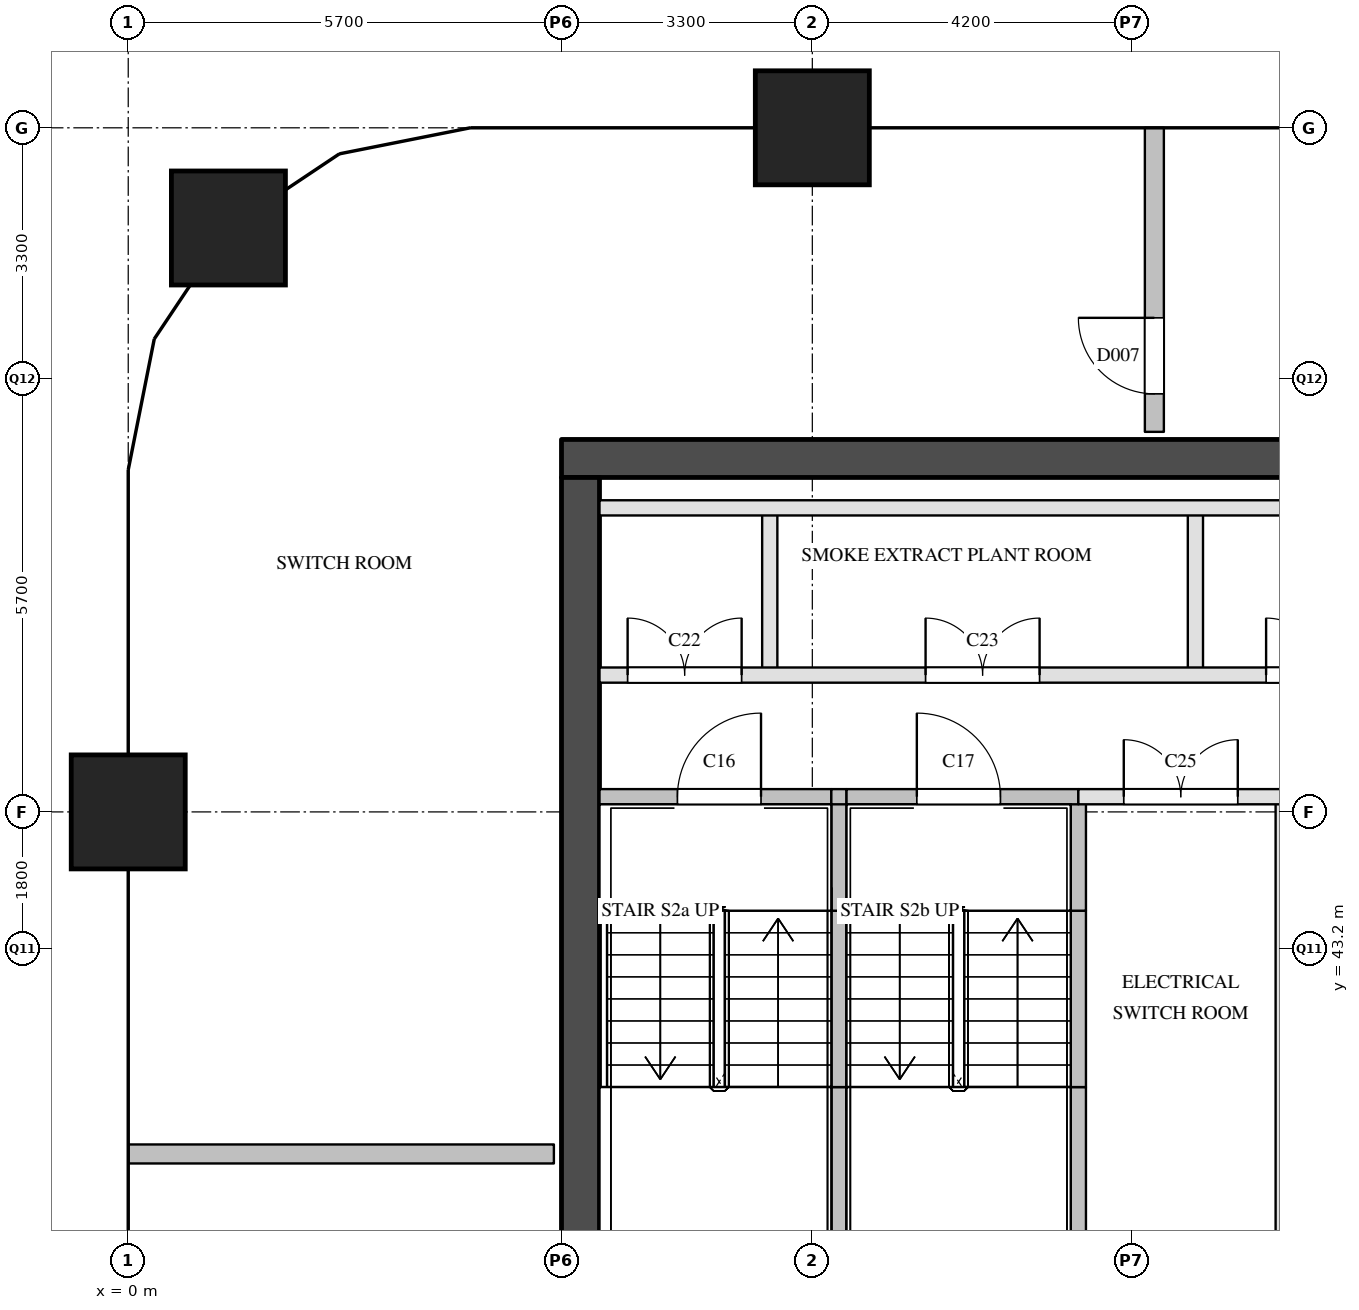
"""IFC4 building model, lengths in metres.
Left out: names, types, materials, properties, quantities, classifications, styles, units other than length and angle.
Written with IfcOpenShell. Run it as: python <this file> out.ifc"""

import sys

from ifc_helpers import new_model, si_unit, direction, frame, frame_2d, origin, origin_2d, place, context, subcontext, project, spatial, rectangle, extrude, element, fill, save


model = new_model("IFC4")
c1 = context("Model", 3, precision=1e-05, world=origin(), true_north=direction((0.0, 1.0)))
c2 = subcontext(c1, "Body", "Model", "MODEL_VIEW")
j1 = project(units=[si_unit("LENGTHUNIT", "METRE"), si_unit("PLANEANGLEUNIT", "RADIAN")], contexts=[c1])
p1 = place(None, origin())
s1 = spatial("IfcSite", under=j1, at=p1, CompositionType="ELEMENT")
p2 = place(p1, origin())
s2 = spatial("IfcBuilding", under=s1, at=p2, CompositionType="ELEMENT")
p3 = place(p2, frame((0.0, 0.0, 197.3)))
s3 = spatial("IfcBuildingStorey", under=s2, at=p3, CompositionType="ELEMENT", Elevation=197.3)
for number, where, z_axis, x_axis in (
    (1, (0.0, 45.0, 0.0), (0.0, 0.0, 1.0), (1.0, 0.0, 0.0)),
    (2, (1.318, 52.682, 0.0), (0.0, 0.0, 1.0), (1.0, 0.0, 0.0)),
    (3, (9.0, 54.0, 0.0), (0.0, 0.0, 1.0), (1.0, 0.0, 0.0)),
):
    element("IfcColumn", number, at=place(p3, frame(where, z_axis=z_axis, x_axis=x_axis)), inside=s3, PredefinedType="COLUMN", context=c2, shape_type="SweptSolid", body=[
        extrude(rectangle(XDim=1.5, YDim=1.5, at=origin_2d()), origin(), (0.0, 0.0, 1.0), 6.0),
    ])
p4 = place(p3, frame((5.7, 49.65, 0.0), z_axis=(0.0, 0.0, 1.0), x_axis=(1.0, 0.0, 0.0)))
e4 = element("IfcWall", 4, at=p4, inside=s3, PredefinedType="SHEAR", context=c2, shape_type="SweptSolid", body=[
    extrude(rectangle(XDim=12.2, YDim=0.5, at=frame_2d((6.1, 0.0))), origin(), (0.0, 0.0, 1.0), 5.7),
])
p5 = place(p3, frame((5.95, 29.1, 0.0), z_axis=(0.0, 0.0, 1.0), x_axis=(0.0, 1.0, 0.0)))
e5 = element("IfcWall", 5, at=p5, inside=s3, PredefinedType="SHEAR", context=c2, shape_type="SweptSolid", body=[
    extrude(rectangle(XDim=20.3, YDim=0.5, at=frame_2d((10.15, 0.0))), origin(), (0.0, 0.0, 1.0), 5.7),
])
p6 = place(p5, frame((3.45, 0.0, 0.0)))
e6 = element("IfcOpeningElement", 6, at=p6, cuts=e5, PredefinedType="OPENING", context=c2, shape_type="SweptSolid", body=[
    extrude(rectangle(XDim=1.0, YDim=2.1, at=frame_2d((0.5, 1.05))), frame((0.0, 0.26, 0.0), z_axis=(0.0, -1.0, 0.0), x_axis=(1.0, 0.0, 0.0)), (0.0, 0.0, 1.0), 0.52),
])
p7 = place(p3, frame((8.44, 46.8, 0.0), z_axis=(0.0, 0.0, 1.0), x_axis=(0.0, 1.0, 0.0)))
e7 = element("IfcWall", 7, at=p7, inside=s3, PredefinedType="PARTITIONING", context=c2, shape_type="SweptSolid", body=[
    extrude(rectangle(XDim=2.2, YDim=0.2, at=frame_2d((1.1, 0.0))), origin(), (0.0, 0.0, 1.0), 5.7),
])
p8 = place(p3, frame((9.35, 39.0, 0.0), z_axis=(0.0, 0.0, 1.0), x_axis=(0.0, 1.0, 0.0)))
e8 = element("IfcWall", 8, at=p8, inside=s3, PredefinedType="SOLIDWALL", context=c2, shape_type="SweptSolid", body=[
    extrude(rectangle(XDim=2.38, YDim=0.2, at=frame_2d((1.19, 0.0))), origin(), (0.0, 0.0, 1.0), 5.7),
])
p9 = place(p3, frame((9.35, 41.38, 0.0), z_axis=(0.0, 0.0, 1.0), x_axis=(0.0, 1.0, 0.0)))
e9 = element("IfcWall", 9, at=p9, inside=s3, PredefinedType="SOLIDWALL", context=c2, shape_type="SweptSolid", body=[
    extrude(rectangle(XDim=2.32, YDim=0.2, at=frame_2d((1.16, 0.0))), origin(), (0.0, 0.0, 1.0), 5.7),
])
p10 = place(p3, frame((9.35, 43.7, 0.0), z_axis=(0.0, 0.0, 1.0), x_axis=(0.0, 1.0, 0.0)))
e10 = element("IfcWall", 10, at=p10, inside=s3, PredefinedType="SOLIDWALL", context=c2, shape_type="SweptSolid", body=[
    extrude(rectangle(XDim=1.5, YDim=0.2, at=frame_2d((0.75, 0.0))), origin(), (0.0, 0.0, 1.0), 5.7),
])
p11 = place(p3, frame((12.5, 39.0, 0.0), z_axis=(0.0, 0.0, 1.0), x_axis=(0.0, 1.0, 0.0)))
e11 = element("IfcWall", 11, at=p11, inside=s3, PredefinedType="SOLIDWALL", context=c2, shape_type="SweptSolid", body=[
    extrude(rectangle(XDim=2.38, YDim=0.2, at=frame_2d((1.19, 0.0))), origin(), (0.0, 0.0, 1.0), 5.7),
])
p12 = place(p3, frame((12.5, 41.38, 0.0), z_axis=(0.0, 0.0, 1.0), x_axis=(0.0, 1.0, 0.0)))
e12 = element("IfcWall", 12, at=p12, inside=s3, PredefinedType="SOLIDWALL", context=c2, shape_type="SweptSolid", body=[
    extrude(rectangle(XDim=2.32, YDim=0.2, at=frame_2d((1.16, 0.0))), origin(), (0.0, 0.0, 1.0), 5.7),
])
p13 = place(p3, frame((12.5, 43.7, 0.0), z_axis=(0.0, 0.0, 1.0), x_axis=(0.0, 1.0, 0.0)))
e13 = element("IfcWall", 13, at=p13, inside=s3, PredefinedType="SOLIDWALL", context=c2, shape_type="SweptSolid", body=[
    extrude(rectangle(XDim=1.5, YDim=0.2, at=frame_2d((0.75, 0.0))), origin(), (0.0, 0.0, 1.0), 5.7),
])
p14 = place(p3, frame((14.04, 46.8, 0.0), z_axis=(0.0, 0.0, 1.0), x_axis=(0.0, 1.0, 0.0)))
e14 = element("IfcWall", 14, at=p14, inside=s3, PredefinedType="PARTITIONING", context=c2, shape_type="SweptSolid", body=[
    extrude(rectangle(XDim=2.2, YDim=0.2, at=frame_2d((1.1, 0.0))), origin(), (0.0, 0.0, 1.0), 5.7),
])
p15 = place(p3, frame((15.195, 39.0, 0.0), z_axis=(0.0, 0.0, 1.0), x_axis=(0.0, 1.0, 0.0)))
e15 = element("IfcWall", 15, at=p15, inside=s3, PredefinedType="PARTITIONING", context=c2, shape_type="SweptSolid", body=[
    extrude(rectangle(XDim=6.2, YDim=0.2, at=frame_2d((3.1, 0.0))), origin(), (0.0, 0.0, 1.0), 5.7),
])
p16 = place(p3, frame((12.5, 45.2, 0.0), z_axis=(0.0, 0.0, 1.0), x_axis=(1.0, 0.0, 0.0)))
e16 = element("IfcWall", 16, at=p16, inside=s3, PredefinedType="PARTITIONING", context=c2, shape_type="SweptSolid", body=[
    extrude(rectangle(XDim=4.9, YDim=0.2, at=frame_2d((2.45, 0.0))), origin(), (0.0, 0.0, 1.0), 5.7),
])
p17 = place(p16, frame((0.597, 0.0, 0.0)))
e17 = element("IfcOpeningElement", 17, at=p17, cuts=e16, PredefinedType="OPENING", context=c2, shape_type="SweptSolid", body=[
    extrude(rectangle(XDim=1.5, YDim=2.1, at=frame_2d((0.75, 1.05))), frame((0.0, 0.11, 0.0), z_axis=(0.0, -1.0, 0.0), x_axis=(1.0, 0.0, 0.0)), (0.0, 0.0, 1.0), 0.22),
])
p18 = place(p16, frame((3.048, 0.0, 0.0)))
e18 = element("IfcOpeningElement", 18, at=p18, cuts=e16, PredefinedType="OPENING", context=c2, shape_type="SweptSolid", body=[
    extrude(rectangle(XDim=1.5, YDim=2.1, at=frame_2d((0.75, 1.05))), frame((0.0, 0.11, 0.0), z_axis=(0.0, -1.0, 0.0), x_axis=(1.0, 0.0, 0.0)), (0.0, 0.0, 1.0), 0.22),
])
p19 = place(p3, frame((6.2, 45.2, 0.0), z_axis=(0.0, 0.0, 1.0), x_axis=(1.0, 0.0, 0.0)))
e19 = element("IfcWall", 19, at=p19, inside=s3, PredefinedType="SOLIDWALL", context=c2, shape_type="SweptSolid", body=[
    extrude(rectangle(XDim=3.05, YDim=0.2, at=frame_2d((1.525, 0.0))), origin(), (0.0, 0.0, 1.0), 5.7),
])
p20 = place(p19, frame((1.025, 0.0, 0.0)))
e20 = element("IfcOpeningElement", 20, at=p20, cuts=e19, PredefinedType="OPENING", context=c2, shape_type="SweptSolid", body=[
    extrude(rectangle(XDim=1.1, YDim=2.1, at=frame_2d((0.55, 1.05))), frame((0.0, 0.11, 0.0), z_axis=(0.0, -1.0, 0.0), x_axis=(1.0, 0.0, 0.0)), (0.0, 0.0, 1.0), 0.22),
])
p21 = place(p3, frame((9.25, 45.2, 0.0), z_axis=(0.0, 0.0, 1.0), x_axis=(1.0, 0.0, 0.0)))
e21 = element("IfcWall", 21, at=p21, inside=s3, PredefinedType="SOLIDWALL", context=c2, shape_type="SweptSolid", body=[
    extrude(rectangle(XDim=0.2, YDim=0.2, at=frame_2d((0.1, 0.0))), origin(), (0.0, 0.0, 1.0), 5.7),
])
p22 = place(p3, frame((9.45, 45.2, 0.0), z_axis=(0.0, 0.0, 1.0), x_axis=(1.0, 0.0, 0.0)))
e22 = element("IfcWall", 22, at=p22, inside=s3, PredefinedType="SOLIDWALL", context=c2, shape_type="SweptSolid", body=[
    extrude(rectangle(XDim=3.05, YDim=0.2, at=frame_2d((1.525, 0.0))), origin(), (0.0, 0.0, 1.0), 5.7),
])
p23 = place(p22, frame((0.925, 0.0, 0.0)))
e23 = element("IfcOpeningElement", 23, at=p23, cuts=e22, PredefinedType="OPENING", context=c2, shape_type="SweptSolid", body=[
    extrude(rectangle(XDim=1.1, YDim=2.1, at=frame_2d((0.55, 1.05))), frame((0.0, 0.11, 0.0), z_axis=(0.0, -1.0, 0.0), x_axis=(1.0, 0.0, 0.0)), (0.0, 0.0, 1.0), 0.22),
])
p24 = place(p3, frame((6.2, 46.8, 0.0), z_axis=(0.0, 0.0, 1.0), x_axis=(1.0, 0.0, 0.0)))
e24 = element("IfcWall", 24, at=p24, inside=s3, PredefinedType="PARTITIONING", context=c2, shape_type="SweptSolid", body=[
    extrude(rectangle(XDim=11.2, YDim=0.2, at=frame_2d((5.6, 0.0))), origin(), (0.0, 0.0, 1.0), 5.7),
])
p25 = place(p24, frame((0.37, 0.0, 0.0)))
e25 = element("IfcOpeningElement", 25, at=p25, cuts=e24, PredefinedType="OPENING", context=c2, shape_type="SweptSolid", body=[
    extrude(rectangle(XDim=1.5, YDim=2.1, at=frame_2d((0.75, 1.05))), frame((0.0, 0.11, 0.0), z_axis=(0.0, -1.0, 0.0), x_axis=(1.0, 0.0, 0.0)), (0.0, 0.0, 1.0), 0.22),
])
p26 = place(p24, frame((4.29, 0.0, 0.0)))
e26 = element("IfcOpeningElement", 26, at=p26, cuts=e24, PredefinedType="OPENING", context=c2, shape_type="SweptSolid", body=[
    extrude(rectangle(XDim=1.5, YDim=2.1, at=frame_2d((0.75, 1.05))), frame((0.0, 0.11, 0.0), z_axis=(0.0, -1.0, 0.0), x_axis=(1.0, 0.0, 0.0)), (0.0, 0.0, 1.0), 0.22),
])
p27 = place(p24, frame((8.77, 0.0, 0.0)))
e27 = element("IfcOpeningElement", 27, at=p27, cuts=e24, PredefinedType="OPENING", context=c2, shape_type="SweptSolid", body=[
    extrude(rectangle(XDim=1.5, YDim=2.1, at=frame_2d((0.75, 1.05))), frame((0.0, 0.11, 0.0), z_axis=(0.0, -1.0, 0.0), x_axis=(1.0, 0.0, 0.0)), (0.0, 0.0, 1.0), 0.22),
])
p28 = place(p3, frame((6.2, 49.0, 0.0), z_axis=(0.0, 0.0, 1.0), x_axis=(1.0, 0.0, 0.0)))
e28 = element("IfcWall", 28, at=p28, inside=s3, PredefinedType="PARTITIONING", context=c2, shape_type="SweptSolid", body=[
    extrude(rectangle(XDim=11.2, YDim=0.2, at=frame_2d((5.6, 0.0))), origin(), (0.0, 0.0, 1.0), 5.7),
])
p29 = place(p3, frame((0.0, 40.5, 0.0), z_axis=(0.0, 0.0, 1.0), x_axis=(1.0, 0.0, 0.0)))
e29 = element("IfcWall", 29, at=p29, inside=s3, PredefinedType="PARTITIONING", context=c2, shape_type="SweptSolid", body=[
    extrude(rectangle(XDim=5.6, YDim=0.25, at=frame_2d((2.8, 0.0))), origin(), (0.0, 0.0, 1.0), 5.7),
])
p30 = place(p3, frame((13.5, 50.0, 0.0), z_axis=(0.0, 0.0, 1.0), x_axis=(0.0, 1.0, 0.0)))
e30 = element("IfcWall", 30, at=p30, inside=s3, PredefinedType="PARTITIONING", context=c2, shape_type="SweptSolid", body=[
    extrude(rectangle(XDim=4.0, YDim=0.25, at=frame_2d((2.0, 0.0))), origin(), (0.0, 0.0, 1.0), 5.7),
])
p31 = place(p30, frame((0.5, 0.0, 0.0)))
e31 = element("IfcOpeningElement", 31, at=p31, cuts=e30, PredefinedType="OPENING", context=c2, shape_type="SweptSolid", body=[
    extrude(rectangle(XDim=1.0, YDim=2.1, at=frame_2d((0.5, 1.05))), frame((0.0, 0.135, 0.0), z_axis=(0.0, -1.0, 0.0), x_axis=(1.0, 0.0, 0.0)), (0.0, 0.0, 1.0), 0.27),
])
p32 = place(p20, origin())
e32 = element("IfcDoor", 32, at=p32, inside=s3, OperationType="SINGLE_SWING_RIGHT", PredefinedType="DOOR", context=c2, shape_type="SweptSolid", body=[
    extrude(rectangle(XDim=1.1, YDim=2.1, at=frame_2d((0.55, 1.05))), frame((0.0, 0.025, 0.0), z_axis=(0.0, -1.0, 0.0), x_axis=(1.0, 0.0, 0.0)), (0.0, 0.0, 1.0), 0.05),
])
fill(e20, e32)
p33 = place(p23, origin())
e33 = element("IfcDoor", 33, at=p33, inside=s3, OperationType="SINGLE_SWING_LEFT", PredefinedType="DOOR", context=c2, shape_type="SweptSolid", body=[
    extrude(rectangle(XDim=1.1, YDim=2.1, at=frame_2d((0.55, 1.05))), frame((0.0, 0.025, 0.0), z_axis=(0.0, -1.0, 0.0), x_axis=(1.0, 0.0, 0.0)), (0.0, 0.0, 1.0), 0.05),
])
fill(e23, e33)
p34 = place(p25, origin())
e34 = element("IfcDoor", 34, at=p34, inside=s3, OperationType="DOUBLE_DOOR_SINGLE_SWING", PredefinedType="DOOR", context=c2, shape_type="SweptSolid", body=[
    extrude(rectangle(XDim=1.5, YDim=2.1, at=frame_2d((0.75, 1.05))), frame((0.0, 0.025, 0.0), z_axis=(0.0, -1.0, 0.0), x_axis=(1.0, 0.0, 0.0)), (0.0, 0.0, 1.0), 0.05),
])
fill(e25, e34)
p35 = place(p26, origin())
e35 = element("IfcDoor", 35, at=p35, inside=s3, OperationType="DOUBLE_DOOR_SINGLE_SWING", PredefinedType="DOOR", context=c2, shape_type="SweptSolid", body=[
    extrude(rectangle(XDim=1.5, YDim=2.1, at=frame_2d((0.75, 1.05))), frame((0.0, 0.025, 0.0), z_axis=(0.0, -1.0, 0.0), x_axis=(1.0, 0.0, 0.0)), (0.0, 0.0, 1.0), 0.05),
])
fill(e26, e35)
p36 = place(p27, origin())
e36 = element("IfcDoor", 36, at=p36, inside=s3, OperationType="DOUBLE_DOOR_SINGLE_SWING", PredefinedType="DOOR", context=c2, shape_type="SweptSolid", body=[
    extrude(rectangle(XDim=1.5, YDim=2.1, at=frame_2d((0.75, 1.05))), frame((0.0, 0.025, 0.0), z_axis=(0.0, -1.0, 0.0), x_axis=(1.0, 0.0, 0.0)), (0.0, 0.0, 1.0), 0.05),
])
fill(e27, e36)
p37 = place(p17, origin())
e37 = element("IfcDoor", 37, at=p37, inside=s3, OperationType="DOUBLE_DOOR_SINGLE_SWING", PredefinedType="DOOR", context=c2, shape_type="SweptSolid", body=[
    extrude(rectangle(XDim=1.5, YDim=2.1, at=frame_2d((0.75, 1.05))), frame((0.0, 0.025, 0.0), z_axis=(0.0, -1.0, 0.0), x_axis=(1.0, 0.0, 0.0)), (0.0, 0.0, 1.0), 0.05),
])
fill(e17, e37)
p38 = place(p31, origin())
e38 = element("IfcDoor", 38, at=p38, inside=s3, OperationType="SINGLE_SWING_RIGHT", PredefinedType="DOOR", context=c2, shape_type="SweptSolid", body=[
    extrude(rectangle(XDim=1.0, YDim=2.1, at=frame_2d((0.5, 1.05))), frame((0.0, 0.025, 0.0), z_axis=(0.0, -1.0, 0.0), x_axis=(1.0, 0.0, 0.0)), (0.0, 0.0, 1.0), 0.05),
])
fill(e31, e38)
save(model, sys.argv[1])
